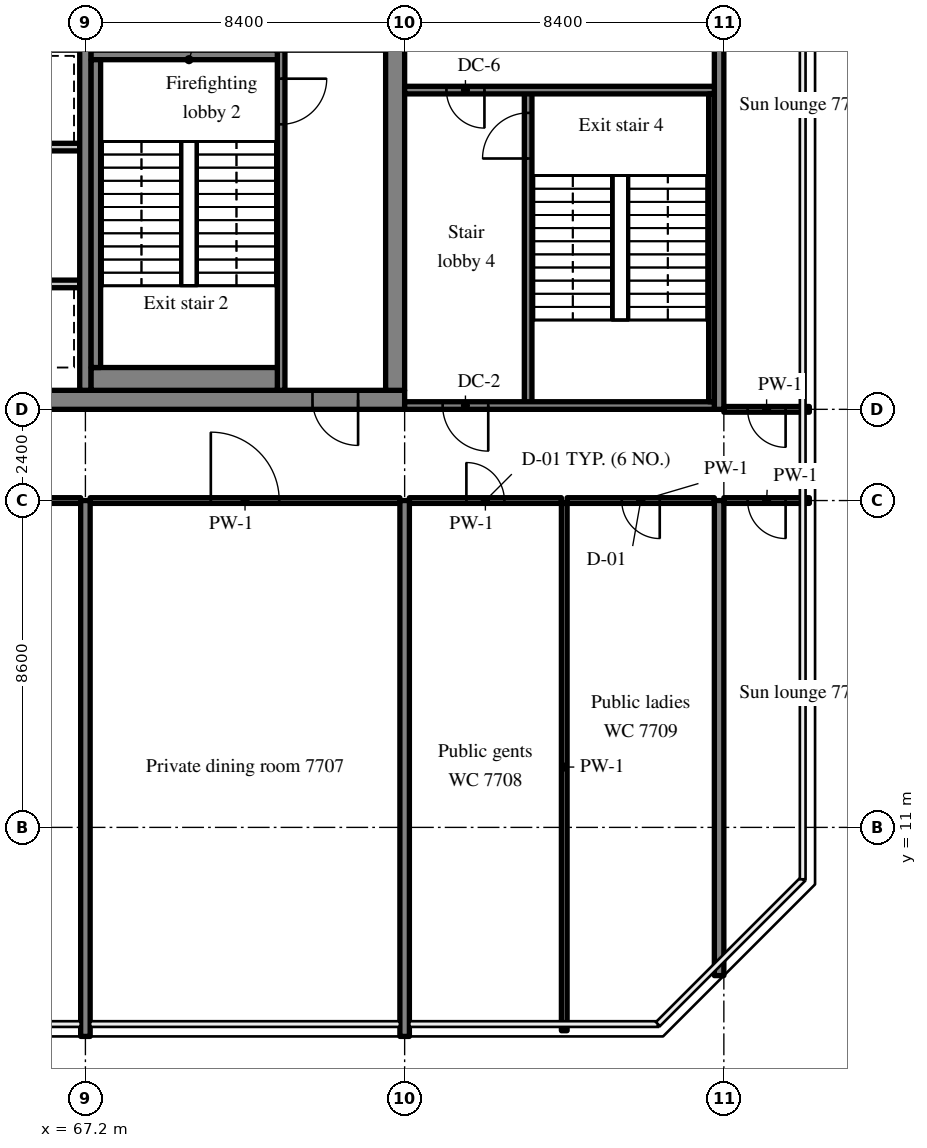
"""IFC4 building model, lengths in metres.
Left out: names, types, materials, properties, quantities, classifications, styles, units other than length and angle.
Written with IfcOpenShell. Run it as: python <this file> out.ifc"""

import sys

from ifc_helpers import new_model, si_unit, direction, frame, frame_2d, origin, place, context, subcontext, project, spatial, rectangle, extrude, source, transform, mapped, element, fill, save


model = new_model("IFC4")
c1 = context("Model", 3, precision=1e-05, world=origin(), true_north=direction((0.0, 1.0)))
c2 = subcontext(c1, "Body", "Model", "MODEL_VIEW")
j1 = project(units=[si_unit("LENGTHUNIT", "METRE"), si_unit("PLANEANGLEUNIT", "RADIAN")], contexts=[c1])
p1 = place(None, origin())
s1 = spatial("IfcSite", under=j1, at=p1, CompositionType="ELEMENT")
p2 = place(p1, origin())
s2 = spatial("IfcBuilding", under=s1, at=p2, CompositionType="ELEMENT")
p3 = place(p2, frame((0.0, 0.0, 323.7)))
s3 = spatial("IfcBuildingStorey", under=s2, at=p3, CompositionType="ELEMENT", Elevation=323.7)
m1 = source(origin(), c2, "Body", "SweptSolid", [
    extrude(rectangle(XDim=50.4, YDim=0.5, at=frame_2d((25.2, 0.0))), origin(), (0.0, 0.0, 1.0), 5.72),
])
p4 = place(p3, frame((25.2, 22.25, 0.0), z_axis=(0.0, 0.0, 1.0), x_axis=(1.0, 0.0, 0.0)))
e1 = element("IfcWall", 1, at=p4, inside=s3, PredefinedType="SHEAR", context=c2, shape_type="MappedRepresentation", body=[
    mapped(m1, transform((0.0, 0.0, 0.0), scale=1.0)),
])
m2 = source(origin(), c2, "Body", "SweptSolid", [
    extrude(rectangle(XDim=1.8, YDim=2.1, at=frame_2d((0.9, 1.05))), frame((0.0, 0.26, 0.0), z_axis=(0.0, -1.0, 0.0), x_axis=(1.0, 0.0, 0.0)), (0.0, 0.0, 1.0), 0.52),
])
p5 = place(p4, frame((15.9, 0.0, 0.0)))
e2 = element("IfcOpeningElement", 2, at=p5, cuts=e1, PredefinedType="OPENING", context=c2, shape_type="MappedRepresentation", body=[
    mapped(m2, transform((0.0, 0.0, 0.0), scale=1.0)),
])
m3 = source(origin(), c2, "Body", "SweptSolid", [
    extrude(rectangle(XDim=0.9, YDim=2.1, at=frame_2d((0.45, 1.05))), frame((0.0, 0.26, 0.0), z_axis=(0.0, -1.0, 0.0), x_axis=(1.0, 0.0, 0.0)), (0.0, 0.0, 1.0), 0.52),
])
p6 = place(p4, frame((9.675, 0.0, 0.0)))
e3 = element("IfcOpeningElement", 3, at=p6, cuts=e1, PredefinedType="OPENING", context=c2, shape_type="MappedRepresentation", body=[
    mapped(m3, transform((0.0, 0.0, 0.0), scale=1.0)),
])
p7 = place(p4, frame((21.525, 0.0, 0.0)))
e4 = element("IfcOpeningElement", 4, at=p7, cuts=e1, PredefinedType="OPENING", context=c2, shape_type="MappedRepresentation", body=[
    mapped(m3, transform((0.0, 0.0, 0.0), scale=1.0)),
])
p8 = place(p4, frame((32.7, 0.0, 0.0)))
e5 = element("IfcOpeningElement", 5, at=p8, cuts=e1, PredefinedType="OPENING", context=c2, shape_type="MappedRepresentation", body=[
    mapped(m2, transform((0.0, 0.0, 0.0), scale=1.0)),
])
m4 = source(origin(), c2, "Body", "SweptSolid", [
    extrude(rectangle(XDim=1.2, YDim=2.1, at=frame_2d((0.6, 1.05))), frame((0.0, 0.26, 0.0), z_axis=(0.0, -1.0, 0.0), x_axis=(1.0, 0.0, 0.0)), (0.0, 0.0, 1.0), 0.52),
])
p9 = place(p4, frame((6.5, 0.0, 0.0)))
e6 = element("IfcOpeningElement", 6, at=p9, cuts=e1, PredefinedType="OPENING", context=c2, shape_type="MappedRepresentation", body=[
    mapped(m4, transform((0.0, 0.0, 0.0), scale=1.0)),
])
p10 = place(p4, frame((47.975, 0.0, 0.0)))
e7 = element("IfcOpeningElement", 7, at=p10, cuts=e1, PredefinedType="OPENING", context=c2, shape_type="MappedRepresentation", body=[
    mapped(m4, transform((0.0, 0.0, 0.0), scale=1.0)),
])
m5 = source(origin(), c2, "Body", "SweptSolid", [
    extrude(rectangle(XDim=19.0, YDim=0.5, at=frame_2d((9.5, 0.0))), origin(), (0.0, 0.0, 1.0), 5.72),
])
p11 = place(p3, frame((75.35, 22.5, 0.0), z_axis=(0.0, 0.0, 1.0), x_axis=(0.0, 1.0, 0.0)))
e8 = element("IfcWall", 8, at=p11, inside=s3, PredefinedType="SHEAR", context=c2, shape_type="MappedRepresentation", body=[
    mapped(m5, transform((0.0, 0.0, 0.0), scale=1.0)),
])
p12 = place(p11, frame((12.9, 0.0, 0.0)))
e9 = element("IfcOpeningElement", 9, at=p12, cuts=e8, PredefinedType="OPENING", context=c2, shape_type="MappedRepresentation", body=[
    mapped(m4, transform((0.0, 0.0, 0.0), scale=1.0)),
])
m6 = source(origin(), c2, "Body", "SweptSolid", [
    extrude(rectangle(XDim=19.0, YDim=0.3, at=frame_2d((9.5, 0.0))), origin(), (0.0, 0.0, 1.0), 5.72),
])
p13 = place(p3, frame((67.2, 22.5, 0.0), z_axis=(0.0, 0.0, 1.0), x_axis=(0.0, 1.0, 0.0)))
e10 = element("IfcWall", 10, at=p13, inside=s3, PredefinedType="SHEAR", context=c2, shape_type="MappedRepresentation", body=[
    mapped(m6, transform((0.0, 0.0, 0.0), scale=1.0)),
])
m7 = source(origin(), c2, "Body", "SweptSolid", [
    extrude(rectangle(XDim=14.1, YDim=0.25, at=frame_2d((7.05, 0.0))), origin(), (0.0, 0.0, 1.0), 5.72),
])
for number, where, z_axis, x_axis in (
    (11, (67.2, 5.5, 0.0), (0.0, 0.0, 1.0), (0.0, 1.0, 0.0)),
    (12, (75.6, 5.5, 0.0), (0.0, 0.0, 1.0), (0.0, 1.0, 0.0)),
):
    element("IfcWall", number, at=place(p3, frame(where, z_axis=z_axis, x_axis=x_axis)), inside=s3, PredefinedType="SHEAR", context=c2, shape_type="MappedRepresentation", body=[
        mapped(m7, transform((0.0, 0.0, 0.0), scale=1.0)),
    ])
m8 = source(origin(), c2, "Body", "SweptSolid", [
    extrude(rectangle(XDim=12.5, YDim=0.25, at=frame_2d((6.25, 0.0))), origin(), (0.0, 0.0, 1.0), 5.72),
])
p14 = place(p3, frame((83.875, 7.1, 0.0), z_axis=(0.0, 0.0, 1.0), x_axis=(0.0, 1.0, 0.0)))
e13 = element("IfcWall", 13, at=p14, inside=s3, PredefinedType="SHEAR", context=c2, shape_type="MappedRepresentation", body=[
    mapped(m8, transform((0.0, 0.0, 0.0), scale=1.0)),
])
m9 = source(origin(), c2, "Body", "SweptSolid", [
    extrude(rectangle(XDim=18.4, YDim=0.25, at=frame_2d((9.2, 0.0))), origin(), (0.0, 0.0, 1.0), 5.72),
])
p15 = place(p3, frame((83.875, 22.0, 0.0), z_axis=(0.0, 0.0, 1.0), x_axis=(0.0, 1.0, 0.0)))
e14 = element("IfcWall", 14, at=p15, inside=s3, PredefinedType="SHEAR", context=c2, shape_type="MappedRepresentation", body=[
    mapped(m9, transform((0.0, 0.0, 0.0), scale=1.0)),
])
m10 = source(origin(), c2, "Body", "SweptSolid", [
    extrude(rectangle(XDim=6.15, YDim=0.2, at=frame_2d((3.075, 0.0))), origin(), (0.0, 0.0, 1.0), 5.72),
])
p16 = place(p3, frame((67.05, 25.3, 0.0), z_axis=(0.0, 0.0, 1.0), x_axis=(-1.0, 0.0, 0.0)))
e15 = element("IfcWall", 15, at=p16, inside=s3, PredefinedType="SOLIDWALL", context=c2, shape_type="MappedRepresentation", body=[
    mapped(m10, transform((0.0, 0.0, 0.0), scale=1.0)),
])
m11 = source(origin(), c2, "Body", "SweptSolid", [
    extrude(rectangle(XDim=1.1, YDim=2.1, at=frame_2d((0.55, 1.05))), frame((0.0, 0.11, 0.0), z_axis=(0.0, -1.0, 0.0), x_axis=(1.0, 0.0, 0.0)), (0.0, 0.0, 1.0), 0.22),
])
p17 = place(p16, frame((1.1, 0.0, 0.0)))
e16 = element("IfcOpeningElement", 16, at=p17, cuts=e15, PredefinedType="OPENING", context=c2, shape_type="MappedRepresentation", body=[
    mapped(m11, transform((0.0, 0.0, 0.0), scale=1.0)),
])
p18 = place(p16, frame((4.1, 0.0, 0.0)))
e17 = element("IfcOpeningElement", 17, at=p18, cuts=e15, PredefinedType="OPENING", context=c2, shape_type="MappedRepresentation", body=[
    mapped(m11, transform((0.0, 0.0, 0.0), scale=1.0)),
])
m12 = source(origin(), c2, "Body", "SweptSolid", [
    extrude(rectangle(XDim=12.15, YDim=0.2, at=frame_2d((6.075, 0.0))), origin(), (0.0, 0.0, 1.0), 5.72),
])
p19 = place(p3, frame((67.05, 28.9, 0.0), z_axis=(0.0, 0.0, 1.0), x_axis=(-1.0, 0.0, 0.0)))
e18 = element("IfcWall", 18, at=p19, inside=s3, PredefinedType="SOLIDWALL", context=c2, shape_type="MappedRepresentation", body=[
    mapped(m12, transform((0.0, 0.0, 0.0), scale=1.0)),
])
p20 = place(p19, frame((7.1, 0.0, 0.0)))
e19 = element("IfcOpeningElement", 19, at=p20, cuts=e18, PredefinedType="OPENING", context=c2, shape_type="MappedRepresentation", body=[
    mapped(m11, transform((0.0, 0.0, 0.0), scale=1.0)),
])
p21 = place(p19, frame((10.1, 0.0, 0.0)))
e20 = element("IfcOpeningElement", 20, at=p21, cuts=e18, PredefinedType="OPENING", context=c2, shape_type="MappedRepresentation", body=[
    mapped(m11, transform((0.0, 0.0, 0.0), scale=1.0)),
])
p22 = place(p19, frame((1.1, 0.0, 0.0)))
e21 = element("IfcOpeningElement", 21, at=p22, cuts=e18, PredefinedType="OPENING", context=c2, shape_type="MappedRepresentation", body=[
    mapped(m11, transform((0.0, 0.0, 0.0), scale=1.0)),
])
p23 = place(p19, frame((4.1, 0.0, 0.0)))
e22 = element("IfcOpeningElement", 22, at=p23, cuts=e18, PredefinedType="OPENING", context=c2, shape_type="MappedRepresentation", body=[
    mapped(m11, transform((0.0, 0.0, 0.0), scale=1.0)),
])
m13 = source(origin(), c2, "Body", "SweptSolid", [
    extrude(rectangle(XDim=8.95, YDim=0.2, at=frame_2d((4.475, 0.0))), origin(), (0.0, 0.0, 1.0), 5.72),
])
p24 = place(p3, frame((72.35, 22.5, 0.0), z_axis=(0.0, 0.0, 1.0), x_axis=(0.0, 1.0, 0.0)))
e23 = element("IfcWall", 23, at=p24, inside=s3, PredefinedType="SOLIDWALL", context=c2, shape_type="MappedRepresentation", body=[
    mapped(m13, transform((0.0, 0.0, 0.0), scale=1.0)),
])
m14 = source(origin(), c2, "Body", "SweptSolid", [
    extrude(rectangle(XDim=1.2, YDim=2.1, at=frame_2d((0.6, 1.05))), frame((0.0, 0.11, 0.0), z_axis=(0.0, -1.0, 0.0), x_axis=(1.0, 0.0, 0.0)), (0.0, 0.0, 1.0), 0.22),
])
p25 = place(p24, frame((7.0, 0.0, 0.0)))
e24 = element("IfcOpeningElement", 24, at=p25, cuts=e23, PredefinedType="OPENING", context=c2, shape_type="MappedRepresentation", body=[
    mapped(m14, transform((0.0, 0.0, 0.0), scale=1.0)),
])
m15 = source(origin(), c2, "Body", "SweptSolid", [
    extrude(rectangle(XDim=8.3, YDim=0.2, at=frame_2d((4.15, 0.0))), origin(), (0.0, 0.0, 1.0), 5.72),
])
p26 = place(p3, frame((78.85, 22.1, 0.0), z_axis=(0.0, 0.0, 1.0), x_axis=(0.0, 1.0, 0.0)))
e25 = element("IfcWall", 25, at=p26, inside=s3, PredefinedType="SOLIDWALL", context=c2, shape_type="MappedRepresentation", body=[
    mapped(m15, transform((0.0, 0.0, 0.0), scale=1.0)),
])
p27 = place(p26, frame((6.5, 0.0, 0.0)))
e26 = element("IfcOpeningElement", 26, at=p27, cuts=e25, PredefinedType="OPENING", context=c2, shape_type="MappedRepresentation", body=[
    mapped(m14, transform((0.0, 0.0, 0.0), scale=1.0)),
])
m16 = source(origin(), c2, "Body", "SweptSolid", [
    extrude(rectangle(XDim=8.15, YDim=0.2, at=frame_2d((4.075, 0.0))), origin(), (0.0, 0.0, 1.0), 5.72),
])
p28 = place(p3, frame((83.75, 22.1, 0.0), z_axis=(0.0, 0.0, 1.0), x_axis=(-1.0, 0.0, 0.0)))
e27 = element("IfcWall", 27, at=p28, inside=s3, PredefinedType="SOLIDWALL", context=c2, shape_type="MappedRepresentation", body=[
    mapped(m16, transform((0.0, 0.0, 0.0), scale=1.0)),
])
p29 = place(p28, frame((5.95, 0.0, 0.0)))
e28 = element("IfcOpeningElement", 28, at=p29, cuts=e27, PredefinedType="OPENING", context=c2, shape_type="MappedRepresentation", body=[
    mapped(m14, transform((0.0, 0.0, 0.0), scale=1.0)),
])
p30 = place(p3, frame((83.75, 30.4, 0.0), z_axis=(0.0, 0.0, 1.0), x_axis=(-1.0, 0.0, 0.0)))
e29 = element("IfcWall", 29, at=p30, inside=s3, PredefinedType="SOLIDWALL", context=c2, shape_type="MappedRepresentation", body=[
    mapped(m16, transform((0.0, 0.0, 0.0), scale=1.0)),
])
m17 = source(origin(), c2, "Body", "SweptSolid", [
    extrude(rectangle(XDim=1.0, YDim=2.1, at=frame_2d((0.5, 1.05))), frame((0.0, 0.11, 0.0), z_axis=(0.0, -1.0, 0.0), x_axis=(1.0, 0.0, 0.0)), (0.0, 0.0, 1.0), 0.22),
])
p31 = place(p30, frame((6.05, 0.0, 0.0)))
e30 = element("IfcOpeningElement", 30, at=p31, cuts=e29, PredefinedType="OPENING", context=c2, shape_type="MappedRepresentation", body=[
    mapped(m17, transform((0.0, 0.0, 0.0), scale=1.0)),
])
m18 = source(origin(), c2, "Body", "SweptSolid", [
    extrude(rectangle(XDim=4.9, YDim=0.6, at=frame_2d((2.45, 0.0))), origin(), (0.0, 0.0, 1.0), 5.72),
])
p32 = place(p3, frame((67.35, 22.8, 0.0), z_axis=(0.0, 0.0, 1.0), x_axis=(1.0, 0.0, 0.0)))
e31 = element("IfcWall", 31, at=p32, inside=s3, PredefinedType="SOLIDWALL", context=c2, shape_type="MappedRepresentation", body=[
    mapped(m18, transform((0.0, 0.0, 0.0), scale=1.0)),
])
m19 = source(origin(), c2, "Body", "SweptSolid", [
    extrude(rectangle(XDim=4.9, YDim=0.25, at=frame_2d((2.45, 0.0))), origin(), (0.0, 0.0, 1.0), 5.72),
])
p33 = place(p3, frame((67.35, 31.325, 0.0), z_axis=(0.0, 0.0, 1.0), x_axis=(1.0, 0.0, 0.0)))
e32 = element("IfcWall", 32, at=p33, inside=s3, PredefinedType="SOLIDWALL", context=c2, shape_type="MappedRepresentation", body=[
    mapped(m19, transform((0.0, 0.0, 0.0), scale=1.0)),
])
m20 = source(origin(), c2, "Body", "SweptSolid", [
    extrude(rectangle(XDim=8.1, YDim=0.25, at=frame_2d((4.05, 0.0))), origin(), (0.0, 0.0, 1.0), 5.72),
])
p34 = place(p3, frame((67.475, 23.1, 0.0), z_axis=(0.0, 0.0, 1.0), x_axis=(0.0, 1.0, 0.0)))
e33 = element("IfcWall", 33, at=p34, inside=s3, PredefinedType="SOLIDWALL", context=c2, shape_type="MappedRepresentation", body=[
    mapped(m20, transform((0.0, 0.0, 0.0), scale=1.0)),
])
m21 = source(origin(), c2, "Body", "SweptSolid", [
    extrude(rectangle(XDim=8.1, YDim=0.15, at=frame_2d((4.05, 0.0))), origin(), (0.0, 0.0, 1.0), 5.72),
])
p35 = place(p3, frame((83.675, 22.2, 0.0), z_axis=(0.0, 0.0, 1.0), x_axis=(0.0, 1.0, 0.0)))
e34 = element("IfcWall", 34, at=p35, inside=s3, PredefinedType="SOLIDWALL", context=c2, shape_type="MappedRepresentation", body=[
    mapped(m21, transform((0.0, 0.0, 0.0), scale=1.0)),
])
m22 = source(origin(), c2, "Body", "SweptSolid", [
    extrude(rectangle(XDim=8.15, YDim=0.15, at=frame_2d((4.075, 0.0))), origin(), (0.0, 0.0, 1.0), 5.02),
])
p36 = place(p3, frame((58.925, 19.6, 0.0), z_axis=(0.0, 0.0, 1.0), x_axis=(1.0, 0.0, 0.0)))
e35 = element("IfcWall", 35, at=p36, inside=s3, PredefinedType="PARTITIONING", context=c2, shape_type="MappedRepresentation", body=[
    mapped(m22, transform((0.0, 0.0, 0.0), scale=1.0)),
])
m23 = source(origin(), c2, "Body", "SweptSolid", [
    extrude(rectangle(XDim=1.8, YDim=2.1, at=frame_2d((0.9, 1.05))), frame((0.0, 0.085, 0.0), z_axis=(0.0, -1.0, 0.0), x_axis=(1.0, 0.0, 0.0)), (0.0, 0.0, 1.0), 0.17),
])
p37 = place(p36, frame((3.175, 0.0, 0.0)))
e36 = element("IfcOpeningElement", 36, at=p37, cuts=e35, PredefinedType="OPENING", context=c2, shape_type="MappedRepresentation", body=[
    mapped(m23, transform((0.0, 0.0, 0.0), scale=1.0)),
])
m24 = source(origin(), c2, "Body", "SweptSolid", [
    extrude(rectangle(XDim=8.15, YDim=0.15, at=frame_2d((4.075, 0.0))), origin(), (0.0, 0.0, 1.0), 5.02),
])
p38 = place(p3, frame((67.325, 19.6, 0.0), z_axis=(0.0, 0.0, 1.0), x_axis=(1.0, 0.0, 0.0)))
e37 = element("IfcWall", 37, at=p38, inside=s3, PredefinedType="PARTITIONING", context=c2, shape_type="MappedRepresentation", body=[
    mapped(m24, transform((0.0, 0.0, 0.0), scale=1.0)),
])
p39 = place(p38, frame((3.175, 0.0, 0.0)))
e38 = element("IfcOpeningElement", 38, at=p39, cuts=e37, PredefinedType="OPENING", context=c2, shape_type="MappedRepresentation", body=[
    mapped(m23, transform((0.0, 0.0, 0.0), scale=1.0)),
])
m25 = source(origin(), c2, "Body", "SweptSolid", [
    extrude(rectangle(XDim=4.0, YDim=0.15, at=frame_2d((2.0, 0.0))), origin(), (0.0, 0.0, 1.0), 5.02),
])
p40 = place(p3, frame((75.725, 19.6, 0.0), z_axis=(0.0, 0.0, 1.0), x_axis=(1.0, 0.0, 0.0)))
e39 = element("IfcWall", 39, at=p40, inside=s3, PredefinedType="PARTITIONING", context=c2, shape_type="MappedRepresentation", body=[
    mapped(m25, transform((0.0, 0.0, 0.0), scale=1.0)),
])
m26 = source(origin(), c2, "Body", "SweptSolid", [
    extrude(rectangle(XDim=1.0, YDim=2.1, at=frame_2d((0.5, 1.05))), frame((0.0, 0.085, 0.0), z_axis=(0.0, -1.0, 0.0), x_axis=(1.0, 0.0, 0.0)), (0.0, 0.0, 1.0), 0.17),
])
p41 = place(p40, frame((1.5, 0.0, 0.0)))
e40 = element("IfcOpeningElement", 40, at=p41, cuts=e39, PredefinedType="OPENING", context=c2, shape_type="MappedRepresentation", body=[
    mapped(m26, transform((0.0, 0.0, 0.0), scale=1.0)),
])
m27 = source(origin(), c2, "Body", "SweptSolid", [
    extrude(rectangle(XDim=3.875, YDim=0.15, at=frame_2d((1.938, 0.0))), origin(), (0.0, 0.0, 1.0), 5.02),
])
p42 = place(p3, frame((79.875, 19.6, 0.0), z_axis=(0.0, 0.0, 1.0), x_axis=(1.0, 0.0, 0.0)))
e41 = element("IfcWall", 41, at=p42, inside=s3, PredefinedType="PARTITIONING", context=c2, shape_type="MappedRepresentation", body=[
    mapped(m27, transform((0.0, 0.0, 0.0), scale=1.0)),
])
p43 = place(p42, frame((1.438, 0.0, 0.0)))
e42 = element("IfcOpeningElement", 42, at=p43, cuts=e41, PredefinedType="OPENING", context=c2, shape_type="MappedRepresentation", body=[
    mapped(m26, transform((0.0, 0.0, 0.0), scale=1.0)),
])
m28 = source(origin(), c2, "Body", "SweptSolid", [
    extrude(rectangle(XDim=13.875, YDim=0.15, at=frame_2d((6.938, 0.0))), origin(), (0.0, 0.0, 1.0), 5.72),
])
p44 = place(p3, frame((79.8, 5.65, 0.0), z_axis=(0.0, 0.0, 1.0), x_axis=(0.0, 1.0, 0.0)))
e43 = element("IfcWall", 43, at=p44, inside=s3, PredefinedType="PARTITIONING", context=c2, shape_type="MappedRepresentation", body=[
    mapped(m28, transform((0.0, 0.0, 0.0), scale=1.0)),
])
m29 = source(origin(), c2, "Body", "SweptSolid", [
    extrude(rectangle(XDim=2.25, YDim=0.15, at=frame_2d((1.125, 0.0))), origin(), (0.0, 0.0, 1.0), 5.02),
])
p45 = place(p3, frame((84.0, 22.0, 0.0), z_axis=(0.0, 0.0, 1.0), x_axis=(1.0, 0.0, 0.0)))
e44 = element("IfcWall", 44, at=p45, inside=s3, PredefinedType="PARTITIONING", context=c2, shape_type="MappedRepresentation", body=[
    mapped(m29, transform((0.0, 0.0, 0.0), scale=1.0)),
])
p46 = place(p45, frame((0.625, 0.0, 0.0)))
e45 = element("IfcOpeningElement", 45, at=p46, cuts=e44, PredefinedType="OPENING", context=c2, shape_type="MappedRepresentation", body=[
    mapped(m26, transform((0.0, 0.0, 0.0), scale=1.0)),
])
p47 = place(p3, frame((84.0, 19.6, 0.0), z_axis=(0.0, 0.0, 1.0), x_axis=(1.0, 0.0, 0.0)))
e46 = element("IfcWall", 46, at=p47, inside=s3, PredefinedType="PARTITIONING", context=c2, shape_type="MappedRepresentation", body=[
    mapped(m29, transform((0.0, 0.0, 0.0), scale=1.0)),
])
p48 = place(p47, frame((0.625, 0.0, 0.0)))
e47 = element("IfcOpeningElement", 47, at=p48, cuts=e46, PredefinedType="OPENING", context=c2, shape_type="MappedRepresentation", body=[
    mapped(m26, transform((0.0, 0.0, 0.0), scale=1.0)),
])
m30 = source(origin(), c2, "Body", "SweptSolid", [
    extrude(rectangle(XDim=1.2, YDim=2.1, at=frame_2d((0.6, 1.05))), frame((0.0, 0.025, 0.0), z_axis=(0.0, -1.0, 0.0), x_axis=(1.0, 0.0, 0.0)), (0.0, 0.0, 1.0), 0.05),
])
p49 = place(p25, origin())
e48 = element("IfcDoor", 48, at=p49, inside=s3, OperationType="SINGLE_SWING_RIGHT", PredefinedType="DOOR", context=c2, shape_type="MappedRepresentation", body=[
    mapped(m30, transform((0.0, 0.0, 0.0), scale=1.0)),
])
fill(e24, e48)
m31 = source(origin(), c2, "Body", "SweptSolid", [
    extrude(rectangle(XDim=1.2, YDim=2.1, at=frame_2d((0.6, 1.05))), frame((0.0, 0.175, 0.0), z_axis=(0.0, -1.0, 0.0), x_axis=(1.0, 0.0, 0.0)), (0.0, 0.0, 1.0), 0.05),
])
p50 = place(p10, origin())
e49 = element("IfcDoor", 49, at=p50, inside=s3, OperationType="SINGLE_SWING_RIGHT", PredefinedType="DOOR", context=c2, shape_type="MappedRepresentation", body=[
    mapped(m31, transform((0.0, 0.0, 0.0), scale=1.0)),
])
fill(e7, e49)
p51 = place(p27, origin())
e50 = element("IfcDoor", 50, at=p51, inside=s3, OperationType="SINGLE_SWING_LEFT", PredefinedType="DOOR", context=c2, shape_type="MappedRepresentation", body=[
    mapped(m30, transform((0.0, 0.0, 0.0), scale=1.0)),
])
fill(e26, e50)
p52 = place(p29, origin())
e51 = element("IfcDoor", 51, at=p52, inside=s3, OperationType="SINGLE_SWING_LEFT", PredefinedType="DOOR", context=c2, shape_type="MappedRepresentation", body=[
    mapped(m30, transform((0.0, 0.0, 0.0), scale=1.0)),
])
fill(e28, e51)
m32 = source(origin(), c2, "Body", "SweptSolid", [
    extrude(rectangle(XDim=1.0, YDim=2.1, at=frame_2d((0.5, 1.05))), frame((0.0, 0.025, 0.0), z_axis=(0.0, -1.0, 0.0), x_axis=(1.0, 0.0, 0.0)), (0.0, 0.0, 1.0), 0.05),
])
p53 = place(p31, origin())
e52 = element("IfcDoor", 52, at=p53, inside=s3, OperationType="SINGLE_SWING_LEFT", PredefinedType="DOOR", context=c2, shape_type="MappedRepresentation", body=[
    mapped(m32, transform((0.0, 0.0, 0.0), scale=1.0)),
])
fill(e30, e52)
m33 = source(origin(), c2, "Body", "SweptSolid", [
    extrude(rectangle(XDim=1.8, YDim=2.1, at=frame_2d((0.9, 1.05))), frame((0.0, 0.025, 0.0), z_axis=(0.0, -1.0, 0.0), x_axis=(1.0, 0.0, 0.0)), (0.0, 0.0, 1.0), 0.05),
])
p54 = place(p39, origin())
e53 = element("IfcDoor", 53, at=p54, inside=s3, OperationType="DOUBLE_DOOR_SINGLE_SWING", PredefinedType="DOOR", context=c2, shape_type="MappedRepresentation", body=[
    mapped(m33, transform((0.0, 0.0, 0.0), scale=1.0)),
])
fill(e38, e53)
p55 = place(p41, origin())
e54 = element("IfcDoor", 54, at=p55, inside=s3, OperationType="SINGLE_SWING_LEFT", PredefinedType="DOOR", context=c2, shape_type="MappedRepresentation", body=[
    mapped(m32, transform((0.0, 0.0, 0.0), scale=1.0)),
])
fill(e40, e54)
p56 = place(p43, origin())
e55 = element("IfcDoor", 55, at=p56, inside=s3, OperationType="SINGLE_SWING_RIGHT", PredefinedType="DOOR", context=c2, shape_type="MappedRepresentation", body=[
    mapped(m32, transform((0.0, 0.0, 0.0), scale=1.0)),
])
fill(e42, e55)
p57 = place(p46, origin())
e56 = element("IfcDoor", 56, at=p57, inside=s3, OperationType="SINGLE_SWING_RIGHT", PredefinedType="DOOR", context=c2, shape_type="MappedRepresentation", body=[
    mapped(m32, transform((0.0, 0.0, 0.0), scale=1.0)),
])
fill(e45, e56)
p58 = place(p48, origin())
e57 = element("IfcDoor", 57, at=p58, inside=s3, OperationType="SINGLE_SWING_RIGHT", PredefinedType="DOOR", context=c2, shape_type="MappedRepresentation", body=[
    mapped(m32, transform((0.0, 0.0, 0.0), scale=1.0)),
])
fill(e47, e57)
save(model, sys.argv[1])
